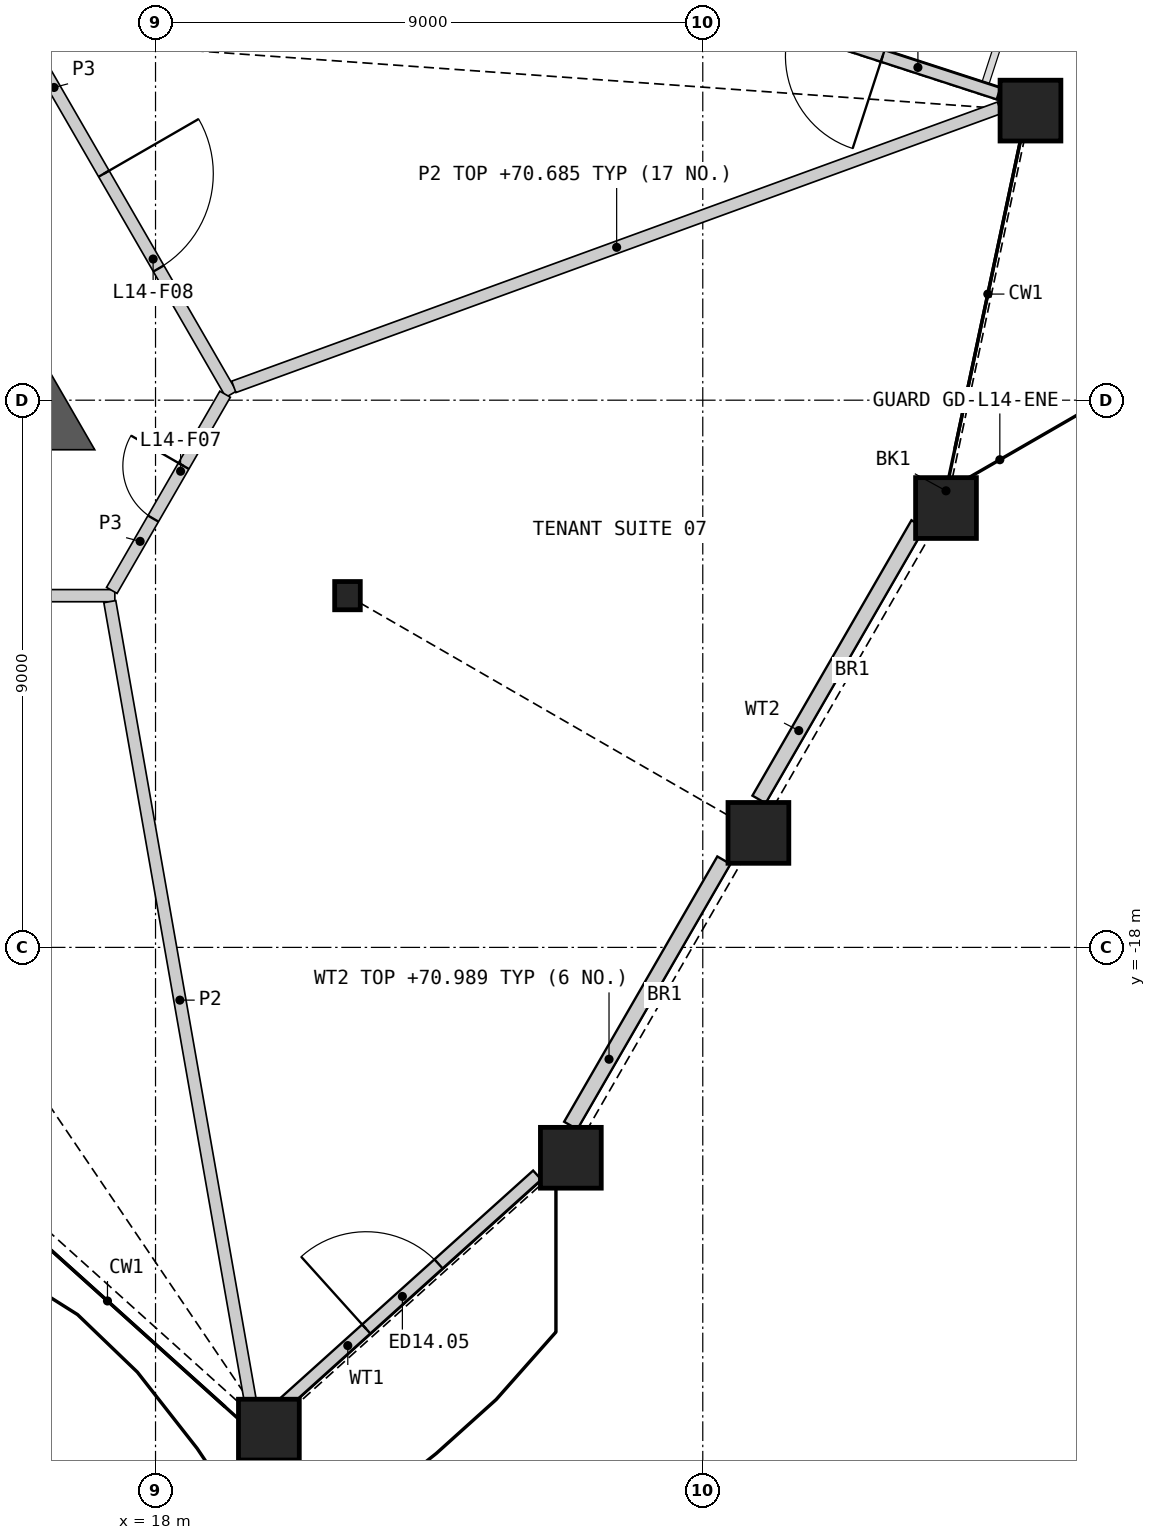
"""IFC4 building model, lengths in metres.
Left out: names, types, materials, properties, quantities, classifications, styles, units other than length and angle.
Written with IfcOpenShell. Run it as: python <this file> out.ifc"""

import sys

from ifc_helpers import new_model, si_unit, direction, frame, frame_2d, origin, origin_2d, place, context, subcontext, project, spatial, polyline, rectangle, hollow_rectangle, i_section, outline, extrude, element, fill, save


model = new_model("IFC4")
c1 = context("Model", 3, precision=1e-05, world=origin(), true_north=direction((0.0, 1.0)))
c2 = subcontext(c1, "Body", "Model", "MODEL_VIEW")
j1 = project(units=[si_unit("LENGTHUNIT", "METRE"), si_unit("PLANEANGLEUNIT", "RADIAN")], contexts=[c1])
p1 = place(None, origin())
s1 = spatial("IfcSite", under=j1, at=p1, CompositionType="ELEMENT")
p2 = place(p1, origin())
s2 = spatial("IfcBuilding", under=s1, at=p2, CompositionType="ELEMENT")
p3 = place(p2, frame((0.0, 0.0, 67.8)))
s3 = spatial("IfcBuildingStorey", under=s2, at=p3, CompositionType="ELEMENT", Elevation=67.8)
for number, where, z_axis, x_axis in (
    (1, (19.864, -25.931, 0.0), (0.0, 0.0, 1.0), (1.0, 0.0, 0.0)),
    (2, (24.83, -21.46, 0.0), (0.0, 0.0, 1.0), (1.0, 0.0, 0.0)),
    (3, (27.915, -16.117, 0.0), (0.0, 0.0, 1.0), (1.0, 0.0, 0.0)),
    (4, (31.0, -10.774, 0.0), (0.0, 0.0, 1.0), (1.0, 0.0, 0.0)),
    (5, (32.389, -4.237, 0.0), (0.0, 0.0, 1.0), (1.0, 0.0, 0.0)),
):
    element("IfcColumn", number, at=place(p3, frame(where, z_axis=z_axis, x_axis=x_axis)), inside=s3, PredefinedType="COLUMN", context=c2, shape_type="SweptSolid", body=[
        extrude(hollow_rectangle(XDim=1.0, YDim=1.0, WallThickness=0.07, at=origin_2d()), origin(), (0.0, 0.0, 1.0), 4.2),
    ])
p4 = place(p3, frame((21.157, -12.215, 0.0), z_axis=(0.0, 0.0, 1.0), x_axis=(1.0, 0.0, 0.0)))
e6 = element("IfcColumn", 6, at=p4, inside=s3, PredefinedType="COLUMN", context=c2, shape_type="SweptSolid", body=[
    extrude(i_section(OverallWidth=0.421, OverallDepth=0.465, WebThickness=0.045, FlangeThickness=0.072, at=origin_2d()), origin(), (0.0, 0.0, 1.0), 4.2),
])
p5 = place(p3, frame((20.124, -25.484, 0.0), z_axis=(0.0, 0.0, 1.0), x_axis=(0.74315945765, 0.669114355327, 0.0)))
e7 = element("IfcWall", 7, at=p5, inside=s3, PredefinedType="SOLIDWALL", context=c2, shape_type="SweptSolid", body=[
    extrude(rectangle(XDim=5.589, YDim=0.2, at=frame_2d((2.794, 0.0))), origin(), (0.0, 0.0, 1.0), 3.189),
])
p6 = place(p5, frame((1.805, 0.0, 0.0)))
e8 = element("IfcOpeningElement", 8, at=p6, cuts=e7, PredefinedType="OPENING", context=c2, shape_type="SweptSolid", body=[
    extrude(rectangle(XDim=1.6, YDim=2.4, at=frame_2d((0.8, 1.2))), frame((0.0, 0.11, 0.0), z_axis=(0.0, -1.0, 0.0), x_axis=(1.0, 0.0, 0.0)), (0.0, 0.0, 1.0), 0.22),
])
p7 = place(p3, frame((24.828, -20.93, 0.0), z_axis=(0.0, 0.0, 1.0), x_axis=(0.500021659459, 0.866012898329, 0.0)))
e9 = element("IfcWall", 9, at=p7, inside=s3, PredefinedType="SOLIDWALL", context=c2, shape_type="SweptSolid", body=[
    extrude(rectangle(XDim=5.038, YDim=0.25, at=frame_2d((2.519, 0.0))), origin(), (0.0, 0.0, 1.0), 3.189),
])
p8 = place(p3, frame((27.925, -15.567, 0.0), z_axis=(0.0, 0.0, 1.0), x_axis=(0.500009302692, 0.866020032806, 0.0)))
e10 = element("IfcWall", 10, at=p8, inside=s3, PredefinedType="SOLIDWALL", context=c2, shape_type="SweptSolid", body=[
    extrude(rectangle(XDim=5.231, YDim=0.25, at=frame_2d((2.615, 0.0))), origin(), (0.0, 0.0, 1.0), 3.189),
])
p9 = place(p3, frame((31.865, -3.958, 0.0), z_axis=(0.0, 0.0, 1.0), x_axis=(-0.951066864375, 0.308985144444, 0.0)))
e11 = element("IfcWall", 11, at=p9, inside=s3, PredefinedType="SOLIDWALL", context=c2, shape_type="SweptSolid", body=[
    extrude(rectangle(XDim=5.579, YDim=0.2, at=frame_2d((2.79, 0.0))), origin(), (0.0, 0.0, 1.0), 3.189),
])
p10 = place(p9, frame((2.003, 0.0, 0.0)))
e12 = element("IfcOpeningElement", 12, at=p10, cuts=e11, PredefinedType="OPENING", context=c2, shape_type="SweptSolid", body=[
    extrude(rectangle(XDim=1.6, YDim=2.4, at=frame_2d((0.8, 1.2))), frame((0.0, 0.11, 0.0), z_axis=(0.0, -1.0, 0.0), x_axis=(1.0, 0.0, 0.0)), (0.0, 0.0, 1.0), 0.22),
])
p11 = place(p3, origin())
e13 = element("IfcWall", 13, at=p11, inside=s3, PredefinedType="SHEAR", context=c2, shape_type="SweptSolid", body=[
    extrude(outline(polyline([(15.441, -9.815), (15.441, -8.915), (16.221, -8.465), (17.0, -9.815), (15.441, -9.815)])), origin(), (0.0, 0.0, 1.0), 3.8),
])
p12 = place(p3, frame((10.821, -12.215, 0.0), z_axis=(0.0, 0.0, 1.0), x_axis=(1.0, 0.0, 0.0)))
e14 = element("IfcWall", 14, at=p12, inside=s3, PredefinedType="PARTITIONING", context=c2, shape_type="SweptSolid", body=[
    extrude(rectangle(XDim=6.51, YDim=0.2, at=frame_2d((3.255, 0.0))), origin(), (0.0, 0.0, 1.0), 3.8),
])
p13 = place(p12, frame((2.655, 0.0, 0.0)))
e15 = element("IfcOpeningElement", 15, at=p13, cuts=e14, PredefinedType="OPENING", context=c2, shape_type="SweptSolid", body=[
    extrude(rectangle(XDim=1.0, YDim=2.1, at=frame_2d((0.5, 1.05))), frame((0.0, 0.11, 0.0), z_axis=(0.0, -1.0, 0.0), x_axis=(1.0, 0.0, 0.0)), (0.0, 0.0, 1.0), 0.22),
])
p14 = place(p3, frame((16.008, -3.296, 0.0), z_axis=(0.0, 0.0, 1.0), x_axis=(0.499984737558, -0.86603421538, 0.0)))
e16 = element("IfcWall", 16, at=p14, inside=s3, PredefinedType="PARTITIONING", context=c2, shape_type="SweptSolid", body=[
    extrude(rectangle(XDim=6.473, YDim=0.2, at=frame_2d((3.236, 0.0))), origin(), (0.0, 0.0, 1.0), 3.8),
])
p15 = place(p14, frame((2.285, 0.0, 0.0)))
e17 = element("IfcOpeningElement", 17, at=p15, cuts=e16, PredefinedType="OPENING", context=c2, shape_type="SweptSolid", body=[
    extrude(rectangle(XDim=1.8, YDim=2.1, at=frame_2d((0.9, 1.05))), frame((0.0, 0.11, 0.0), z_axis=(0.0, -1.0, 0.0), x_axis=(1.0, 0.0, 0.0)), (0.0, 0.0, 1.0), 0.22),
])
p16 = place(p3, frame((17.281, -12.128, 0.0), z_axis=(0.0, 0.0, 1.0), x_axis=(0.499958791762, 0.866049194065, 0.0)))
e18 = element("IfcWall", 18, at=p16, inside=s3, PredefinedType="PARTITIONING", context=c2, shape_type="SweptSolid", body=[
    extrude(rectangle(XDim=3.726, YDim=0.2, at=frame_2d((1.863, 0.0))), origin(), (0.0, 0.0, 1.0), 3.8),
])
p17 = place(p16, frame((1.363, 0.0, 0.0)))
e19 = element("IfcOpeningElement", 19, at=p17, cuts=e18, PredefinedType="OPENING", context=c2, shape_type="SweptSolid", body=[
    extrude(rectangle(XDim=1.0, YDim=2.1, at=frame_2d((0.5, 1.05))), frame((0.0, 0.11, 0.0), z_axis=(0.0, -1.0, 0.0), x_axis=(1.0, 0.0, 0.0)), (0.0, 0.0, 1.0), 0.22),
])
p18 = place(p3, frame((19.288, -8.781, 0.0), z_axis=(0.0, 0.0, 1.0), x_axis=(0.939515478087, 0.34250644729, 0.0)))
e20 = element("IfcWall", 20, at=p18, inside=s3, PredefinedType="PARTITIONING", context=c2, shape_type="SweptSolid", body=[
    extrude(rectangle(XDim=13.402, YDim=0.2, at=frame_2d((6.701, 0.0))), origin(), (0.0, 0.0, 1.0), 2.885),
])
p19 = place(p3, frame((17.248, -12.313, 0.0), z_axis=(0.0, 0.0, 1.0), x_axis=(0.173132292437, -0.984898578187, 0.0)))
e21 = element("IfcWall", 21, at=p19, inside=s3, PredefinedType="PARTITIONING", context=c2, shape_type="SweptSolid", body=[
    extrude(rectangle(XDim=13.309, YDim=0.2, at=frame_2d((6.654, 0.0))), origin(), (0.0, 0.0, 1.0), 2.885),
])
p20 = place(p6, origin())
e22 = element("IfcDoor", 22, at=p20, inside=s3, OperationType="DOUBLE_DOOR_SINGLE_SWING", PredefinedType="DOOR", context=c2, shape_type="SweptSolid", body=[
    extrude(rectangle(XDim=1.6, YDim=2.4, at=frame_2d((0.8, 1.2))), frame((0.0, 0.025, 0.0), z_axis=(0.0, -1.0, 0.0), x_axis=(1.0, 0.0, 0.0)), (0.0, 0.0, 1.0), 0.05),
])
fill(e8, e22)
p21 = place(p10, origin())
e23 = element("IfcDoor", 23, at=p21, inside=s3, OperationType="DOUBLE_DOOR_SINGLE_SWING", PredefinedType="DOOR", context=c2, shape_type="SweptSolid", body=[
    extrude(rectangle(XDim=1.6, YDim=2.4, at=frame_2d((0.8, 1.2))), frame((0.0, 0.025, 0.0), z_axis=(0.0, -1.0, 0.0), x_axis=(1.0, 0.0, 0.0)), (0.0, 0.0, 1.0), 0.05),
])
fill(e12, e23)
p22 = place(p17, origin())
e24 = element("IfcDoor", 24, at=p22, inside=s3, OperationType="SINGLE_SWING_RIGHT", PredefinedType="DOOR", context=c2, shape_type="SweptSolid", body=[
    extrude(rectangle(XDim=1.0, YDim=2.1, at=frame_2d((0.5, 1.05))), frame((0.0, 0.025, 0.0), z_axis=(0.0, -1.0, 0.0), x_axis=(1.0, 0.0, 0.0)), (0.0, 0.0, 1.0), 0.05),
])
fill(e19, e24)
p23 = place(p15, origin())
e25 = element("IfcDoor", 25, at=p23, inside=s3, OperationType="DOUBLE_DOOR_SINGLE_SWING", PredefinedType="DOOR", context=c2, shape_type="SweptSolid", body=[
    extrude(rectangle(XDim=1.8, YDim=2.1, at=frame_2d((0.9, 1.05))), frame((0.0, 0.025, 0.0), z_axis=(0.0, -1.0, 0.0), x_axis=(1.0, 0.0, 0.0)), (0.0, 0.0, 1.0), 0.05),
])
fill(e17, e25)
save(model, sys.argv[1])
